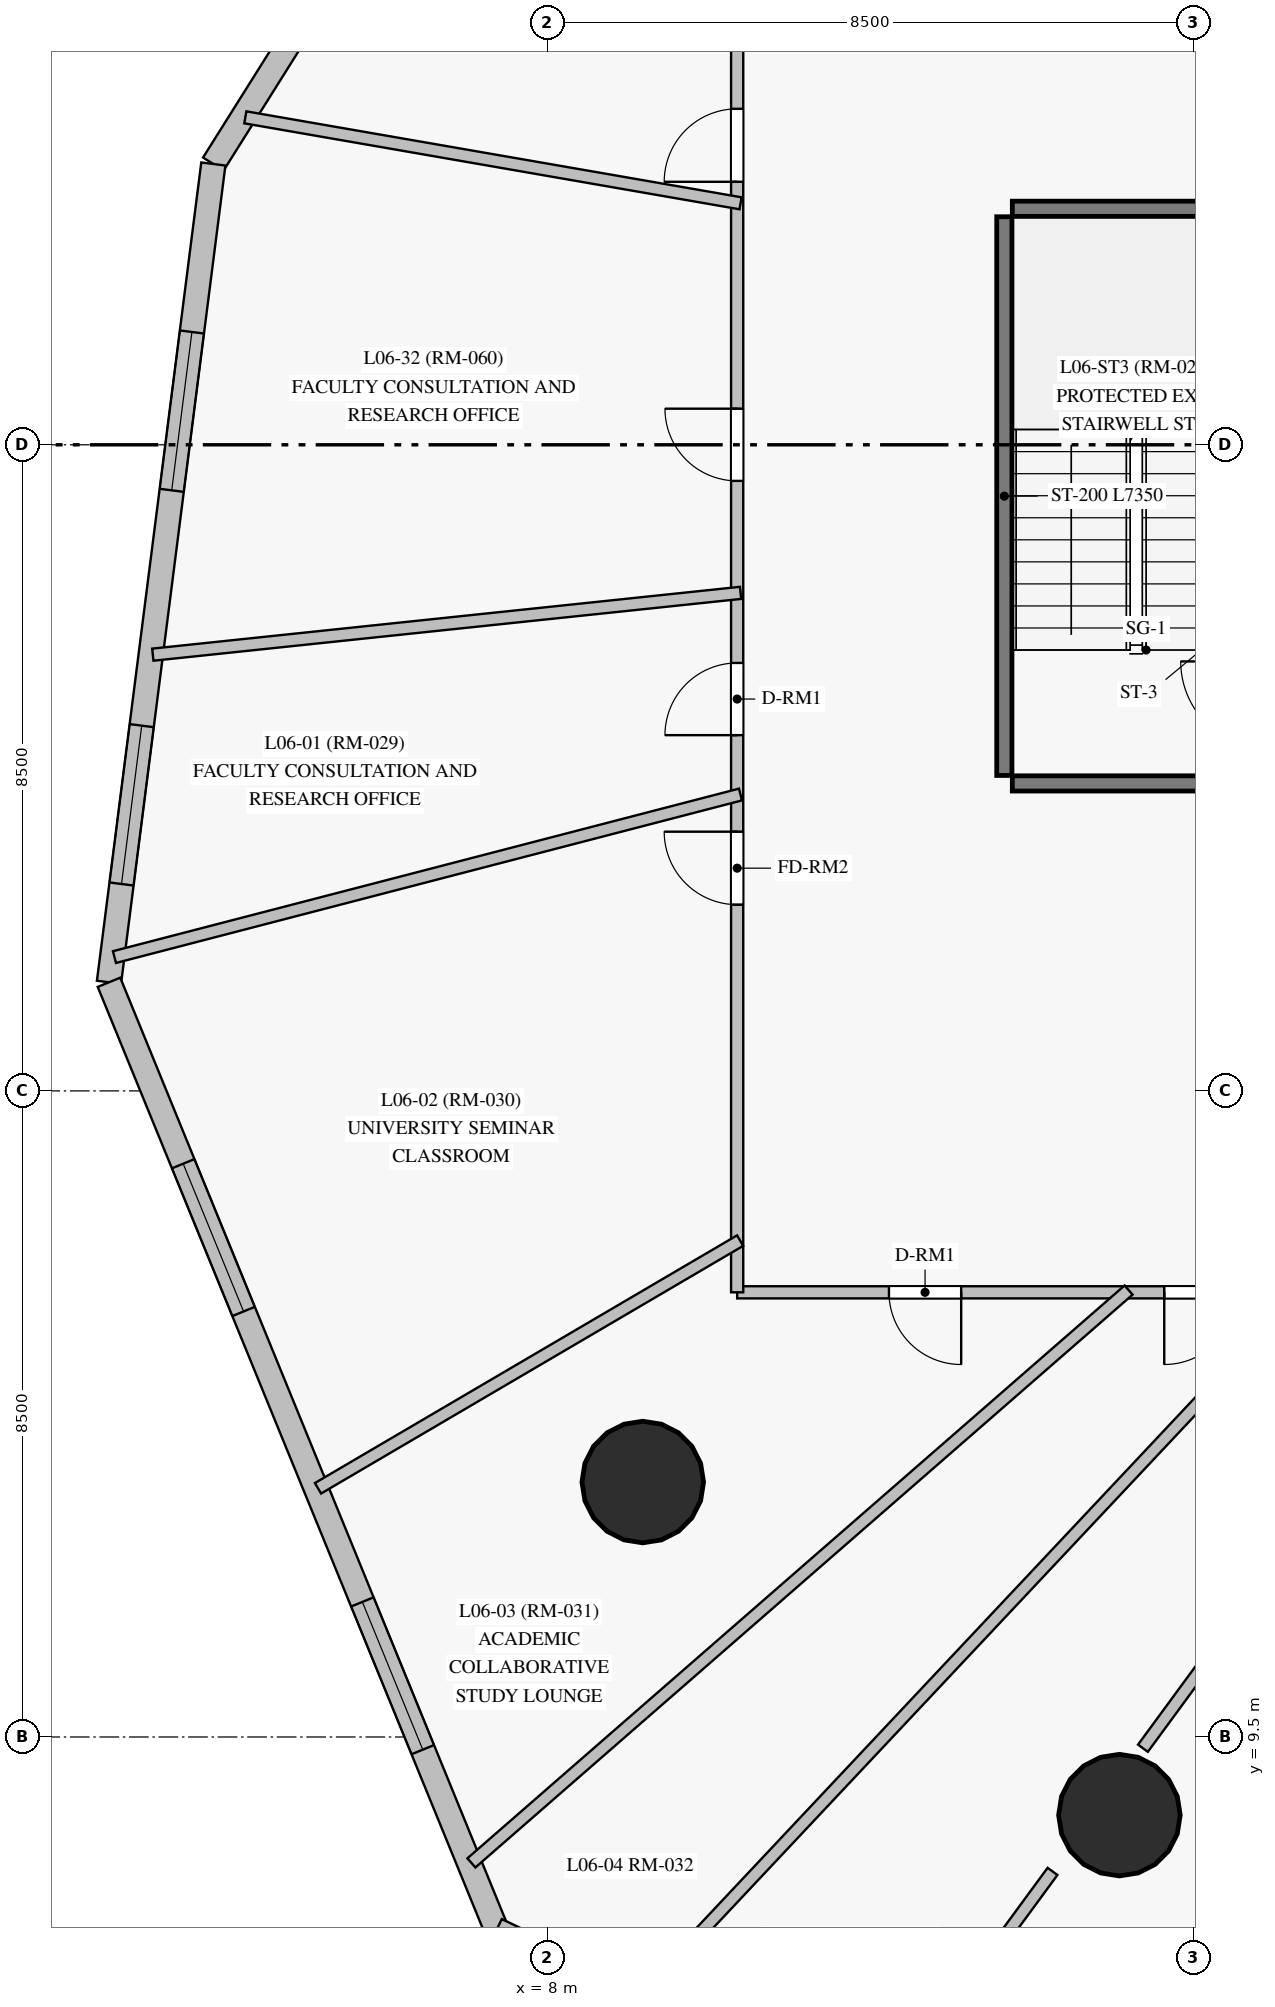
"""IFC4 building model, lengths in metres.
Left out: names, types, materials, properties, quantities, classifications, styles, units other than length and angle.
Written with IfcOpenShell. Run it as: python <this file> out.ifc"""

import sys

from ifc_helpers import new_model, si_unit, direction, frame, frame_2d, origin, origin_with_axes, origin_2d, place, context, subcontext, project, spatial, rectangle, circle, extrude, source, transform, mapped, element, fill, save


model = new_model("IFC4")
c1 = context("Model", 3, precision=1e-05, world=origin(), true_north=direction((0.0, 1.0)))
c2 = subcontext(c1, "Body", "Model", "MODEL_VIEW")
j1 = project(units=[si_unit("LENGTHUNIT", "METRE"), si_unit("PLANEANGLEUNIT", "RADIAN")], contexts=[c1])
p1 = place(None, origin())
s1 = spatial("IfcSite", under=j1, at=p1, CompositionType="ELEMENT")
p2 = place(p1, origin())
s2 = spatial("IfcBuilding", under=s1, at=p2, CompositionType="ELEMENT")
p3 = place(p2, frame((0.0, 0.0, 26.5)))
s3 = spatial("IfcBuildingStorey", under=s2, at=p3, CompositionType="ELEMENT", Elevation=26.5)
m1 = source(origin_with_axes(), c2, "Body", "SweptSolid", [
    extrude(circle(Radius=0.8, at=origin_2d()), origin(), (0.0, 0.0, 1.0), 3.6),
])
for number, where, z_axis, x_axis in (
    (1, (9.258, 12.854, 0.0), (0.0, 0.0, 1.0), (1.0, 0.0, 0.0)),
    (2, (15.529, 8.472, 0.0), (0.0, 0.0, 1.0), (1.0, 0.0, 0.0)),
):
    element("IfcColumn", number, at=place(p3, frame(where, z_axis=z_axis, x_axis=x_axis)), inside=s3, PredefinedType="COLUMN", context=c2, shape_type="MappedRepresentation", body=[
        mapped(m1, transform((0.0, 0.0, 0.0), scale=1.0)),
    ])
p4 = place(p3, frame((7.944, 37.096, 0.0), z_axis=(0.0, 0.0, 1.0), x_axis=(-0.531962963156, -0.846767622096, 0.0)))
e3 = element("IfcWall", 3, at=p4, inside=s3, PredefinedType="SOLIDWALL", context=c2, shape_type="SweptSolid", body=[
    extrude(rectangle(XDim=8.151, YDim=0.32, at=frame_2d((4.075, 0.0))), origin(), (0.0, 0.0, 1.0), 3.35),
])
p5 = place(p4, frame((2.677, 0.0, 0.85)))
e4 = element("IfcOpeningElement", 4, at=p5, cuts=e3, PredefinedType="OPENING", context=c2, shape_type="SweptSolid", body=[
    extrude(rectangle(XDim=2.1, YDim=1.95, at=frame_2d((1.05, 0.975))), frame((0.0, 0.17, 0.0), z_axis=(0.0, -1.0, 0.0), x_axis=(1.0, 0.0, 0.0)), (0.0, 0.0, 1.0), 0.34),
])
p6 = place(p3, frame((3.608, 30.194, 0.0), z_axis=(0.0, 0.0, 1.0), x_axis=(-0.126495776424, -0.991967145901, 0.0)))
e5 = element("IfcWall", 5, at=p6, inside=s3, PredefinedType="SOLIDWALL", context=c2, shape_type="SweptSolid", body=[
    extrude(rectangle(XDim=10.853, YDim=0.32, at=frame_2d((5.426, 0.0))), origin(), (0.0, 0.0, 1.0), 3.35),
])
p7 = place(p6, frame((2.228, 0.0, 0.85)))
e6 = element("IfcOpeningElement", 6, at=p7, cuts=e5, PredefinedType="OPENING", context=c2, shape_type="SweptSolid", body=[
    extrude(rectangle(XDim=2.1, YDim=1.95, at=frame_2d((1.05, 0.975))), frame((0.0, 0.17, 0.0), z_axis=(0.0, -1.0, 0.0), x_axis=(1.0, 0.0, 0.0)), (0.0, 0.0, 1.0), 0.34),
])
p8 = place(p6, frame((7.449, 0.0, 0.85)))
e7 = element("IfcOpeningElement", 7, at=p8, cuts=e5, PredefinedType="OPENING", context=c2, shape_type="SweptSolid", body=[
    extrude(rectangle(XDim=2.1, YDim=1.95, at=frame_2d((1.05, 0.975))), frame((0.0, 0.17, 0.0), z_axis=(0.0, -1.0, 0.0), x_axis=(1.0, 0.0, 0.0)), (0.0, 0.0, 1.0), 0.34),
])
p9 = place(p3, frame((2.236, 19.429, 0.0), z_axis=(0.0, 0.0, 1.0), x_axis=(0.378495223181, -0.925603244392, 0.0)))
e8 = element("IfcWall", 8, at=p9, inside=s3, PredefinedType="SOLIDWALL", context=c2, shape_type="SweptSolid", body=[
    extrude(rectangle(XDim=13.47, YDim=0.32, at=frame_2d((6.735, 0.0))), origin(), (0.0, 0.0, 1.0), 3.35),
])
p10 = place(p9, frame((2.579, 0.0, 0.85)))
e9 = element("IfcOpeningElement", 9, at=p10, cuts=e8, PredefinedType="OPENING", context=c2, shape_type="SweptSolid", body=[
    extrude(rectangle(XDim=2.1, YDim=1.95, at=frame_2d((1.05, 0.975))), frame((0.0, 0.17, 0.0), z_axis=(0.0, -1.0, 0.0), x_axis=(1.0, 0.0, 0.0)), (0.0, 0.0, 1.0), 0.34),
])
p11 = place(p9, frame((8.807, 0.0, 0.85)))
e10 = element("IfcOpeningElement", 10, at=p11, cuts=e8, PredefinedType="OPENING", context=c2, shape_type="SweptSolid", body=[
    extrude(rectangle(XDim=2.1, YDim=1.95, at=frame_2d((1.05, 0.975))), frame((0.0, 0.17, 0.0), z_axis=(0.0, -1.0, 0.0), x_axis=(1.0, 0.0, 0.0)), (0.0, 0.0, 1.0), 0.34),
])
p12 = place(p3, frame((7.334, 6.961, 0.0), z_axis=(0.0, 0.0, 1.0), x_axis=(0.901738594253, -0.432281745664, 0.0)))
e11 = element("IfcWall", 11, at=p12, inside=s3, PredefinedType="SOLIDWALL", context=c2, shape_type="SweptSolid", body=[
    extrude(rectangle(XDim=10.83, YDim=0.32, at=frame_2d((5.415, 0.0))), origin(), (0.0, 0.0, 1.0), 3.35),
])
p13 = place(p12, frame((2.771, 0.0, 0.85)))
e12 = element("IfcOpeningElement", 12, at=p13, cuts=e11, PredefinedType="OPENING", context=c2, shape_type="SweptSolid", body=[
    extrude(rectangle(XDim=2.1, YDim=1.95, at=frame_2d((1.05, 0.975))), frame((0.0, 0.17, 0.0), z_axis=(0.0, -1.0, 0.0), x_axis=(1.0, 0.0, 0.0)), (0.0, 0.0, 1.0), 0.34),
])
p14 = place(p12, frame((6.439, 0.0, 0.85)))
e13 = element("IfcOpeningElement", 13, at=p14, cuts=e11, PredefinedType="OPENING", context=c2, shape_type="SweptSolid", body=[
    extrude(rectangle(XDim=2.1, YDim=1.95, at=frame_2d((1.05, 0.975))), frame((0.0, 0.17, 0.0), z_axis=(0.0, -1.0, 0.0), x_axis=(1.0, 0.0, 0.0)), (0.0, 0.0, 1.0), 0.34),
])
p15 = place(p3, frame((14.015, 22.15, 0.0), z_axis=(0.0, 0.0, 1.0), x_axis=(0.0, 1.0, 0.0)))
e14 = element("IfcWall", 14, at=p15, inside=s3, PredefinedType="SHEAR", context=c2, shape_type="SweptSolid", body=[
    extrude(rectangle(XDim=7.35, YDim=0.2, at=frame_2d((3.675, 0.0))), origin(), (0.0, 0.0, 1.0), 3.35),
])
for number, where, z_axis, x_axis in (
    (15, (14.12, 22.045, 0.0), (0.0, 0.0, 1.0), (1.0, 0.0, 0.0)),
    (16, (14.12, 29.605, 0.0), (0.0, 0.0, 1.0), (1.0, 0.0, 0.0)),
):
    element("IfcWall", number, at=place(p3, frame(where, z_axis=z_axis, x_axis=x_axis)), inside=s3, PredefinedType="SHEAR", context=c2, shape_type="SweptSolid", body=[
        extrude(rectangle(XDim=3.26, YDim=0.2, at=frame_2d((1.63, 0.0))), origin(), (0.0, 0.0, 1.0), 3.35),
    ])
p16 = place(p3, frame((40.25, 15.35, 0.0), z_axis=(0.0, 0.0, 1.0), x_axis=(-1.0, 0.0, 0.0)))
e17 = element("IfcWall", 17, at=p16, inside=s3, PredefinedType="PARTITIONING", context=c2, shape_type="SweptSolid", body=[
    extrude(rectangle(XDim=29.75, YDim=0.16, at=frame_2d((14.875, 0.0))), origin(), (0.0, 0.0, 1.0), 2.7),
])
p17 = place(p16, frame((26.803, 0.0, 0.0)))
e18 = element("IfcOpeningElement", 18, at=p17, cuts=e17, PredefinedType="OPENING", context=c2, shape_type="SweptSolid", body=[
    extrude(rectangle(XDim=0.95, YDim=2.15, at=frame_2d((0.475, 1.075))), frame((0.0, 0.09, 0.0), z_axis=(0.0, -1.0, 0.0), x_axis=(1.0, 0.0, 0.0)), (0.0, 0.0, 1.0), 0.18),
])
p18 = place(p16, frame((23.181, 0.0, 0.0)))
e19 = element("IfcOpeningElement", 19, at=p18, cuts=e17, PredefinedType="OPENING", context=c2, shape_type="SweptSolid", body=[
    extrude(rectangle(XDim=0.95, YDim=2.15, at=frame_2d((0.475, 1.075))), frame((0.0, 0.09, 0.0), z_axis=(0.0, -1.0, 0.0), x_axis=(1.0, 0.0, 0.0)), (0.0, 0.0, 1.0), 0.18),
])
p19 = place(p16, frame((21.097, 0.0, 0.0)))
e20 = element("IfcOpeningElement", 20, at=p19, cuts=e17, PredefinedType="OPENING", context=c2, shape_type="SweptSolid", body=[
    extrude(rectangle(XDim=0.95, YDim=2.15, at=frame_2d((0.475, 1.075))), frame((0.0, 0.09, 0.0), z_axis=(0.0, -1.0, 0.0), x_axis=(1.0, 0.0, 0.0)), (0.0, 0.0, 1.0), 0.18),
])
p20 = place(p16, frame((18.772, 0.0, 0.0)))
e21 = element("IfcOpeningElement", 21, at=p20, cuts=e17, PredefinedType="OPENING", context=c2, shape_type="SweptSolid", body=[
    extrude(rectangle(XDim=0.95, YDim=2.15, at=frame_2d((0.475, 1.075))), frame((0.0, 0.09, 0.0), z_axis=(0.0, -1.0, 0.0), x_axis=(1.0, 0.0, 0.0)), (0.0, 0.0, 1.0), 0.18),
])
p21 = place(p16, frame((16.089, 0.0, 0.0)))
e22 = element("IfcOpeningElement", 22, at=p21, cuts=e17, PredefinedType="OPENING", context=c2, shape_type="SweptSolid", body=[
    extrude(rectangle(XDim=0.96, YDim=2.15, at=frame_2d((0.48, 1.075))), frame((0.0, 0.09, 0.0), z_axis=(0.0, -1.0, 0.0), x_axis=(1.0, 0.0, 0.0)), (0.0, 0.0, 1.0), 0.18),
])
p22 = place(p16, frame((14.21, 0.0, 0.0)))
e23 = element("IfcOpeningElement", 23, at=p22, cuts=e17, PredefinedType="OPENING", context=c2, shape_type="SweptSolid", body=[
    extrude(rectangle(XDim=0.95, YDim=2.15, at=frame_2d((0.475, 1.075))), frame((0.0, 0.09, 0.0), z_axis=(0.0, -1.0, 0.0), x_axis=(1.0, 0.0, 0.0)), (0.0, 0.0, 1.0), 0.18),
])
p23 = place(p16, frame((11.995, 0.0, 0.0)))
e24 = element("IfcOpeningElement", 24, at=p23, cuts=e17, PredefinedType="OPENING", context=c2, shape_type="SweptSolid", body=[
    extrude(rectangle(XDim=0.95, YDim=2.15, at=frame_2d((0.475, 1.075))), frame((0.0, 0.09, 0.0), z_axis=(0.0, -1.0, 0.0), x_axis=(1.0, 0.0, 0.0)), (0.0, 0.0, 1.0), 0.18),
])
p24 = place(p16, frame((10.127, 0.0, 0.0)))
e25 = element("IfcOpeningElement", 25, at=p24, cuts=e17, PredefinedType="OPENING", context=c2, shape_type="SweptSolid", body=[
    extrude(rectangle(XDim=0.96, YDim=2.15, at=frame_2d((0.48, 1.075))), frame((0.0, 0.09, 0.0), z_axis=(0.0, -1.0, 0.0), x_axis=(1.0, 0.0, 0.0)), (0.0, 0.0, 1.0), 0.18),
])
p25 = place(p16, frame((6.962, 0.0, 0.0)))
e26 = element("IfcOpeningElement", 26, at=p25, cuts=e17, PredefinedType="OPENING", context=c2, shape_type="SweptSolid", body=[
    extrude(rectangle(XDim=0.95, YDim=2.15, at=frame_2d((0.475, 1.075))), frame((0.0, 0.09, 0.0), z_axis=(0.0, -1.0, 0.0), x_axis=(1.0, 0.0, 0.0)), (0.0, 0.0, 1.0), 0.18),
])
p26 = place(p16, frame((1.325, 0.0, 0.0)))
e27 = element("IfcOpeningElement", 27, at=p26, cuts=e17, PredefinedType="OPENING", context=c2, shape_type="SweptSolid", body=[
    extrude(rectangle(XDim=0.95, YDim=2.15, at=frame_2d((0.475, 1.075))), frame((0.0, 0.09, 0.0), z_axis=(0.0, -1.0, 0.0), x_axis=(1.0, 0.0, 0.0)), (0.0, 0.0, 1.0), 0.18),
])
p27 = place(p3, frame((10.5, 15.35, 0.0), z_axis=(0.0, 0.0, 1.0), x_axis=(0.0, 1.0, 0.0)))
e28 = element("IfcWall", 28, at=p27, inside=s3, PredefinedType="PARTITIONING", context=c2, shape_type="SweptSolid", body=[
    extrude(rectangle(XDim=22.3, YDim=0.16, at=frame_2d((11.15, 0.0))), origin(), (0.0, 0.0, 1.0), 2.75),
])
p28 = place(p27, frame((7.33, 0.0, 0.0)))
e29 = element("IfcOpeningElement", 29, at=p28, cuts=e28, PredefinedType="OPENING", context=c2, shape_type="SweptSolid", body=[
    extrude(rectangle(XDim=0.95, YDim=2.15, at=frame_2d((0.475, 1.075))), frame((0.0, 0.09, 0.0), z_axis=(0.0, -1.0, 0.0), x_axis=(1.0, 0.0, 0.0)), (0.0, 0.0, 1.0), 0.18),
])
p29 = place(p27, frame((5.1, 0.0, 0.0)))
e30 = element("IfcOpeningElement", 30, at=p29, cuts=e28, PredefinedType="OPENING", context=c2, shape_type="SweptSolid", body=[
    extrude(rectangle(XDim=0.96, YDim=2.15, at=frame_2d((0.48, 1.075))), frame((0.0, 0.09, 0.0), z_axis=(0.0, -1.0, 0.0), x_axis=(1.0, 0.0, 0.0)), (0.0, 0.0, 1.0), 0.18),
])
p30 = place(p27, frame((14.61, 0.0, 0.0)))
e31 = element("IfcOpeningElement", 31, at=p30, cuts=e28, PredefinedType="OPENING", context=c2, shape_type="SweptSolid", body=[
    extrude(rectangle(XDim=0.96, YDim=2.15, at=frame_2d((0.48, 1.075))), frame((0.0, 0.09, 0.0), z_axis=(0.0, -1.0, 0.0), x_axis=(1.0, 0.0, 0.0)), (0.0, 0.0, 1.0), 0.18),
])
p31 = place(p27, frame((10.675, 0.0, 0.0)))
e32 = element("IfcOpeningElement", 32, at=p31, cuts=e28, PredefinedType="OPENING", context=c2, shape_type="SweptSolid", body=[
    extrude(rectangle(XDim=0.95, YDim=2.15, at=frame_2d((0.475, 1.075))), frame((0.0, 0.09, 0.0), z_axis=(0.0, -1.0, 0.0), x_axis=(1.0, 0.0, 0.0)), (0.0, 0.0, 1.0), 0.18),
])
p32 = place(p3, frame((22.498, 15.376, 0.0), z_axis=(0.0, 0.0, 1.0), x_axis=(-0.470669828434, -0.882309419989, 0.0)))
e33 = element("IfcWall", 33, at=p32, inside=s3, PredefinedType="PARTITIONING", context=c2, shape_type="SweptSolid", body=[
    extrude(rectangle(XDim=14.132, YDim=0.16, at=frame_2d((7.066, 0.0))), origin(), (0.0, 0.0, 1.0), 3.35),
])
p33 = place(p3, frame((17.956, 15.372, 0.0), z_axis=(0.0, 0.0, 1.0), x_axis=(-0.684954139438, -0.728586183554, 0.0)))
e34 = element("IfcWall", 34, at=p33, inside=s3, PredefinedType="PARTITIONING", context=c2, shape_type="SweptSolid", body=[
    extrude(rectangle(XDim=12.746, YDim=0.16, at=frame_2d((6.373, 0.0))), origin(), (0.0, 0.0, 1.0), 2.7),
])
p34 = place(p3, frame((15.65, 15.38, 0.0), z_axis=(0.0, 0.0, 1.0), x_axis=(-0.753853018897, -0.657043092879, 0.0)))
e35 = element("IfcWall", 35, at=p34, inside=s3, PredefinedType="PARTITIONING", context=c2, shape_type="SweptSolid", body=[
    extrude(rectangle(XDim=11.469, YDim=0.16, at=frame_2d((5.735, 0.0))), origin(), (0.0, 0.0, 1.0), 3.35),
])
p35 = place(p3, frame((10.543, 21.899, 0.0), z_axis=(0.0, 0.0, 1.0), x_axis=(-0.96789820828, -0.25134251214, 0.0)))
e36 = element("IfcWall", 36, at=p35, inside=s3, PredefinedType="PARTITIONING", context=c2, shape_type="SweptSolid", body=[
    extrude(rectangle(XDim=8.509, YDim=0.16, at=frame_2d((4.254, 0.0))), origin(), (0.0, 0.0, 1.0), 3.35),
])
p36 = place(p3, frame((2.812, 23.739, 0.0), z_axis=(0.0, 0.0, 1.0), x_axis=(0.994515255514, 0.104591617975, 0.0)))
e37 = element("IfcWall", 37, at=p36, inside=s3, PredefinedType="PARTITIONING", context=c2, shape_type="SweptSolid", body=[
    extrude(rectangle(XDim=7.775, YDim=0.16, at=frame_2d((3.888, 0.0))), origin(), (0.0, 0.0, 1.0), 3.35),
])
p37 = place(p3, frame((20.268, 15.386, 0.0), z_axis=(0.0, 0.0, 1.0), x_axis=(-0.591743955509, -0.806125977201, 0.0)))
e38 = element("IfcWall", 38, at=p37, inside=s3, PredefinedType="PARTITIONING", context=c2, shape_type="SweptSolid", body=[
    extrude(rectangle(XDim=7.485, YDim=0.16, at=frame_2d((3.743, 0.0))), origin(), (0.0, 0.0, 1.0), 2.7),
])
p38 = place(p3, frame((10.544, 29.677, 0.0), z_axis=(0.0, 0.0, 1.0), x_axis=(-0.985268064988, 0.171017075509, 0.0)))
e39 = element("IfcWall", 39, at=p38, inside=s3, PredefinedType="PARTITIONING", context=c2, shape_type="SweptSolid", body=[
    extrude(rectangle(XDim=6.613, YDim=0.16, at=frame_2d((3.306, 0.0))), origin(), (0.0, 0.0, 1.0), 3.35),
])
p39 = place(p3, frame((10.539, 16.031, 0.0), z_axis=(0.0, 0.0, 1.0), x_axis=(-0.862473711585, -0.50610186408, 0.0)))
e40 = element("IfcWall", 40, at=p39, inside=s3, PredefinedType="PARTITIONING", context=c2, shape_type="SweptSolid", body=[
    extrude(rectangle(XDim=6.439, YDim=0.16, at=frame_2d((3.219, 0.0))), origin(), (0.0, 0.0, 1.0), 3.35),
])
p40 = place(p3, frame((14.649, 7.731, 0.0), z_axis=(0.0, 0.0, 1.0), x_axis=(-0.591711140864, -0.806150064056, 0.0)))
e41 = element("IfcWall", 41, at=p40, inside=s3, PredefinedType="PARTITIONING", context=c2, shape_type="SweptSolid", body=[
    extrude(rectangle(XDim=3.898, YDim=0.16, at=frame_2d((1.949, 0.0))), origin(), (0.0, 0.0, 1.0), 3.35),
])
m2 = source(origin_with_axes(), c2, "Body", "SweptSolid", [
    extrude(rectangle(XDim=2.1, YDim=1.95, at=frame_2d((1.05, 0.975))), frame((0.0, 0.03, 0.0), z_axis=(0.0, -1.0, 0.0), x_axis=(1.0, 0.0, 0.0)), (0.0, 0.0, 1.0), 0.06),
])
p41 = place(p7, origin())
e42 = element("IfcWindow", 42, at=p41, inside=s3, PartitioningType="SINGLE_PANEL", PredefinedType="WINDOW", context=c2, shape_type="MappedRepresentation", body=[
    mapped(m2, transform((0.0, 0.0, 0.0), scale=1.0)),
])
fill(e6, e42)
p42 = place(p8, origin())
e43 = element("IfcWindow", 43, at=p42, inside=s3, PartitioningType="SINGLE_PANEL", PredefinedType="WINDOW", context=c2, shape_type="MappedRepresentation", body=[
    mapped(m2, transform((0.0, 0.0, 0.0), scale=1.0)),
])
fill(e7, e43)
p43 = place(p10, origin())
e44 = element("IfcWindow", 44, at=p43, inside=s3, PartitioningType="SINGLE_PANEL", PredefinedType="WINDOW", context=c2, shape_type="MappedRepresentation", body=[
    mapped(m2, transform((0.0, 0.0, 0.0), scale=1.0)),
])
fill(e9, e44)
p44 = place(p11, origin())
e45 = element("IfcWindow", 45, at=p44, inside=s3, PartitioningType="SINGLE_PANEL", PredefinedType="WINDOW", context=c2, shape_type="MappedRepresentation", body=[
    mapped(m2, transform((0.0, 0.0, 0.0), scale=1.0)),
])
fill(e10, e45)
m3 = source(origin_with_axes(), c2, "Body", "SweptSolid", [
    extrude(rectangle(XDim=0.95, YDim=2.15, at=frame_2d((0.475, 1.075))), frame((0.0, 0.025, 0.0), z_axis=(0.0, -1.0, 0.0), x_axis=(1.0, 0.0, 0.0)), (0.0, 0.0, 1.0), 0.05),
])
p45 = place(p28, origin())
e46 = element("IfcDoor", 46, at=p45, inside=s3, OperationType="SINGLE_SWING_LEFT", PredefinedType="DOOR", context=c2, shape_type="MappedRepresentation", body=[
    mapped(m3, transform((0.0, 0.0, 0.0), scale=1.0)),
])
fill(e29, e46)
m4 = source(origin_with_axes(), c2, "Body", "SweptSolid", [
    extrude(rectangle(XDim=0.96, YDim=2.15, at=frame_2d((0.48, 1.075))), frame((0.0, 0.025, 0.0), z_axis=(0.0, -1.0, 0.0), x_axis=(1.0, 0.0, 0.0)), (0.0, 0.0, 1.0), 0.05),
])
p46 = place(p29, origin())
e47 = element("IfcDoor", 47, at=p46, inside=s3, OperationType="SINGLE_SWING_RIGHT", PredefinedType="DOOR", context=c2, shape_type="MappedRepresentation", body=[
    mapped(m4, transform((0.0, 0.0, 0.0), scale=1.0)),
])
fill(e30, e47)
p47 = place(p17, origin())
e48 = element("IfcDoor", 48, at=p47, inside=s3, OperationType="SINGLE_SWING_LEFT", PredefinedType="DOOR", context=c2, shape_type="MappedRepresentation", body=[
    mapped(m3, transform((0.0, 0.0, 0.0), scale=1.0)),
])
fill(e18, e48)
p48 = place(p18, origin())
e49 = element("IfcDoor", 49, at=p48, inside=s3, OperationType="SINGLE_SWING_RIGHT", PredefinedType="DOOR", context=c2, shape_type="MappedRepresentation", body=[
    mapped(m3, transform((0.0, 0.0, 0.0), scale=1.0)),
])
fill(e19, e49)
p49 = place(p30, origin())
e50 = element("IfcDoor", 50, at=p49, inside=s3, OperationType="SINGLE_SWING_LEFT", PredefinedType="DOOR", context=c2, shape_type="MappedRepresentation", body=[
    mapped(m4, transform((0.0, 0.0, 0.0), scale=1.0)),
])
fill(e31, e50)
p50 = place(p31, origin())
e51 = element("IfcDoor", 51, at=p50, inside=s3, OperationType="SINGLE_SWING_RIGHT", PredefinedType="DOOR", context=c2, shape_type="MappedRepresentation", body=[
    mapped(m3, transform((0.0, 0.0, 0.0), scale=1.0)),
])
fill(e32, e51)
save(model, sys.argv[1])
